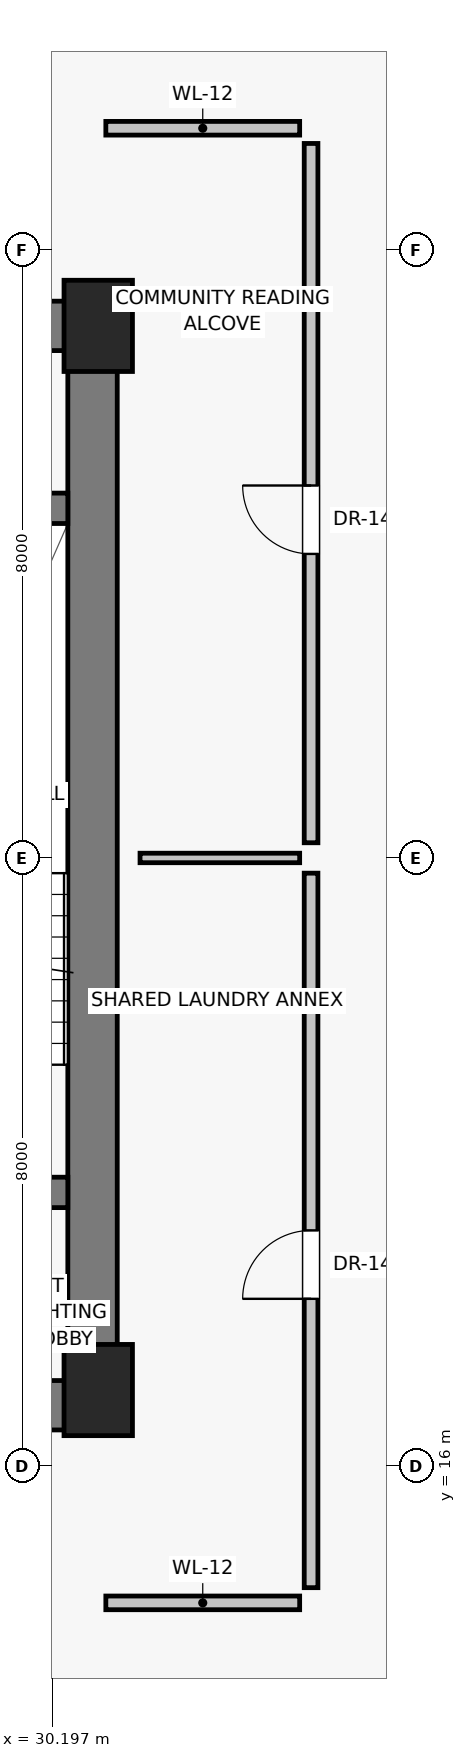
"""IFC4 building model, lengths in metres.
Left out: names, types, materials, properties, quantities, classifications, styles, units other than length and angle.
Written with IfcOpenShell. Run it as: python <this file> out.ifc"""

import sys

from ifc_helpers import new_model, si_unit, direction, frame, frame_2d, origin, origin_2d, place, context, subcontext, project, spatial, rectangle, extrude, source, transform, mapped, element, fill, save


model = new_model("IFC4")
c1 = context("Model", 3, precision=1e-05, world=origin(), true_north=direction((0.0, 1.0)))
c2 = subcontext(c1, "Body", "Model", "MODEL_VIEW")
j1 = project(units=[si_unit("LENGTHUNIT", "METRE"), si_unit("PLANEANGLEUNIT", "RADIAN")], contexts=[c1])
p1 = place(None, origin())
s1 = spatial("IfcSite", under=j1, at=p1, CompositionType="ELEMENT")
p2 = place(p1, origin())
s2 = spatial("IfcBuilding", under=s1, at=p2, CompositionType="ELEMENT")
p3 = place(p2, frame((0.0, 0.0, 139.25)))
s3 = spatial("IfcBuildingStorey", under=s2, at=p3, CompositionType="ELEMENT", Elevation=139.25)
for number, where, z_axis, x_axis in (
    (1, (30.8, 17.0, 0.0), (0.0, 0.0, 1.0), (1.0, 0.0, 0.0)),
    (2, (30.8, 31.0, 0.0), (0.0, 0.0, 1.0), (1.0, 0.0, 0.0)),
):
    element("IfcColumn", number, at=place(p3, frame(where, z_axis=z_axis, x_axis=x_axis)), inside=s3, PredefinedType="PILASTER", context=c2, shape_type="SweptSolid", body=[
        extrude(rectangle(XDim=0.9, YDim=1.2, at=origin_2d()), origin(), (0.0, 0.0, 1.0), 3.25),
    ])
p4 = place(p3, frame((30.725, 16.8, 0.0), z_axis=(0.0, 0.0, 1.0), x_axis=(0.0, 1.0, 0.0)))
e3 = element("IfcWall", 3, at=p4, inside=s3, PredefinedType="SHEAR", context=c2, shape_type="SweptSolid", body=[
    extrude(rectangle(XDim=14.2, YDim=0.65, at=frame_2d((7.1, 0.0))), origin(), (0.0, 0.0, 1.0), 3.0),
])
p5 = place(p3, frame((24.95, 16.8, 0.0), z_axis=(0.0, 0.0, 1.0), x_axis=(1.0, 0.0, 0.0)))
e4 = element("IfcWall", 4, at=p5, inside=s3, PredefinedType="SHEAR", context=c2, shape_type="SweptSolid", body=[
    extrude(rectangle(XDim=5.85, YDim=0.65, at=frame_2d((2.925, 0.0))), origin(), (0.0, 0.0, 1.0), 3.0),
])
p6 = place(p5, frame((2.15, 0.0, 0.0)))
e5 = element("IfcOpeningElement", 5, at=p6, cuts=e4, PredefinedType="OPENING", context=c2, shape_type="SweptSolid", body=[
    extrude(rectangle(XDim=1.2, YDim=2.03, at=frame_2d((0.6, 1.015))), frame((0.0, 0.335, 0.0), z_axis=(0.0, -1.0, 0.0), x_axis=(1.0, 0.0, 0.0)), (0.0, 0.0, 1.0), 0.67),
])
p7 = place(p3, frame((27.0, 31.0, 0.0), z_axis=(0.0, 0.0, 1.0), x_axis=(1.0, 0.0, 0.0)))
e6 = element("IfcWall", 6, at=p7, inside=s3, PredefinedType="SHEAR", context=c2, shape_type="SweptSolid", body=[
    extrude(rectangle(XDim=3.8, YDim=0.65, at=frame_2d((1.9, 0.0))), origin(), (0.0, 0.0, 1.0), 3.0),
])
p8 = place(p7, frame((0.45, 0.0, 0.0)))
e7 = element("IfcOpeningElement", 7, at=p8, cuts=e6, PredefinedType="OPENING", context=c2, shape_type="SweptSolid", body=[
    extrude(rectangle(XDim=0.86, YDim=2.01, at=frame_2d((0.43, 1.005))), frame((0.0, 0.335, 0.0), z_axis=(0.0, -1.0, 0.0), x_axis=(1.0, 0.0, 0.0)), (0.0, 0.0, 1.0), 0.67),
])
p9 = place(p7, frame((1.9, 0.0, 0.0)))
e8 = element("IfcOpeningElement", 8, at=p9, cuts=e6, PredefinedType="OPENING", context=c2, shape_type="SweptSolid", body=[
    extrude(rectangle(XDim=0.86, YDim=2.01, at=frame_2d((0.43, 1.005))), frame((0.0, 0.335, 0.0), z_axis=(0.0, -1.0, 0.0), x_axis=(1.0, 0.0, 0.0)), (0.0, 0.0, 1.0), 0.67),
])
p10 = place(p3, frame((27.0, 19.6, 0.0), z_axis=(0.0, 0.0, 1.0), x_axis=(1.0, 0.0, 0.0)))
e9 = element("IfcWall", 9, at=p10, inside=s3, PredefinedType="SHEAR", context=c2, shape_type="SweptSolid", body=[
    extrude(rectangle(XDim=3.4, YDim=0.4, at=frame_2d((1.7, 0.0))), origin(), (0.0, 0.0, 1.0), 3.0),
])
p11 = place(p10, frame((1.05, 0.0, 0.0)))
e10 = element("IfcOpeningElement", 10, at=p11, cuts=e9, PredefinedType="OPENING", context=c2, shape_type="SweptSolid", body=[
    extrude(rectangle(XDim=1.1, YDim=2.03, at=frame_2d((0.55, 1.015))), frame((0.0, 0.21, 0.0), z_axis=(0.0, -1.0, 0.0), x_axis=(1.0, 0.0, 0.0)), (0.0, 0.0, 1.0), 0.42),
])
p12 = place(p3, frame((27.0, 28.6, 0.0), z_axis=(0.0, 0.0, 1.0), x_axis=(1.0, 0.0, 0.0)))
e11 = element("IfcWall", 11, at=p12, inside=s3, PredefinedType="SHEAR", context=c2, shape_type="SweptSolid", body=[
    extrude(rectangle(XDim=3.4, YDim=0.4, at=frame_2d((1.7, 0.0))), origin(), (0.0, 0.0, 1.0), 3.0),
])
p13 = place(p3, frame((33.6, 14.4, 0.0), z_axis=(0.0, 0.0, 1.0), x_axis=(0.0, 1.0, 0.0)))
e12 = element("IfcWall", 12, at=p13, inside=s3, PredefinedType="PARTITIONING", context=c2, shape_type="SweptSolid", body=[
    extrude(rectangle(XDim=9.4, YDim=0.18, at=frame_2d((4.7, 0.0))), origin(), (0.0, 0.0, 1.0), 3.0),
])
p14 = place(p13, frame((3.8, 0.0, 0.0)))
e13 = element("IfcOpeningElement", 13, at=p14, cuts=e12, PredefinedType="OPENING", context=c2, shape_type="SweptSolid", body=[
    extrude(rectangle(XDim=0.9, YDim=2.01, at=frame_2d((0.45, 1.005))), frame((0.0, 0.1, 0.0), z_axis=(0.0, -1.0, 0.0), x_axis=(1.0, 0.0, 0.0)), (0.0, 0.0, 1.0), 0.2),
])
p15 = place(p3, frame((33.6, 24.2, 0.0), z_axis=(0.0, 0.0, 1.0), x_axis=(0.0, 1.0, 0.0)))
e14 = element("IfcWall", 14, at=p15, inside=s3, PredefinedType="PARTITIONING", context=c2, shape_type="SweptSolid", body=[
    extrude(rectangle(XDim=9.2, YDim=0.18, at=frame_2d((4.6, 0.0))), origin(), (0.0, 0.0, 1.0), 3.0),
])
p16 = place(p15, frame((3.8, 0.0, 0.0)))
e15 = element("IfcOpeningElement", 15, at=p16, cuts=e14, PredefinedType="OPENING", context=c2, shape_type="SweptSolid", body=[
    extrude(rectangle(XDim=0.9, YDim=2.01, at=frame_2d((0.45, 1.005))), frame((0.0, 0.1, 0.0), z_axis=(0.0, -1.0, 0.0), x_axis=(1.0, 0.0, 0.0)), (0.0, 0.0, 1.0), 0.2),
])
p17 = place(p3, frame((31.35, 24.0, 0.0), z_axis=(0.0, 0.0, 1.0), x_axis=(1.0, 0.0, 0.0)))
e16 = element("IfcWall", 16, at=p17, inside=s3, PredefinedType="PARTITIONING", context=c2, shape_type="SweptSolid", body=[
    extrude(rectangle(XDim=2.1, YDim=0.125, at=frame_2d((1.05, 0.0))), origin(), (0.0, 0.0, 1.0), 3.0),
])
for number, where, z_axis, x_axis in (
    (17, (30.9, 14.2, 0.0), (0.0, 0.0, 1.0), (1.0, 0.0, 0.0)),
    (18, (30.9, 33.6, 0.0), (0.0, 0.0, 1.0), (1.0, 0.0, 0.0)),
):
    element("IfcWall", number, at=place(p3, frame(where, z_axis=z_axis, x_axis=x_axis)), inside=s3, PredefinedType="PARTITIONING", context=c2, shape_type="SweptSolid", body=[
        extrude(rectangle(XDim=2.55, YDim=0.18, at=frame_2d((1.275, 0.0))), origin(), (0.0, 0.0, 1.0), 3.0),
    ])
m1 = source(origin(), c2, "Body", "SweptSolid", [
    extrude(rectangle(XDim=0.9, YDim=2.01, at=frame_2d((0.45, 1.005))), frame((0.0, 0.025, 0.0), z_axis=(0.0, -1.0, 0.0), x_axis=(1.0, 0.0, 0.0)), (0.0, 0.0, 1.0), 0.05),
])
p18 = place(p14, origin())
e19 = element("IfcDoor", 19, at=p18, inside=s3, OperationType="SINGLE_SWING_LEFT", PredefinedType="DOOR", context=c2, shape_type="MappedRepresentation", body=[
    mapped(m1, transform((0.0, 0.0, 0.0), scale=1.0)),
])
fill(e13, e19)
p19 = place(p16, origin())
e20 = element("IfcDoor", 20, at=p19, inside=s3, OperationType="SINGLE_SWING_RIGHT", PredefinedType="DOOR", context=c2, shape_type="MappedRepresentation", body=[
    mapped(m1, transform((0.0, 0.0, 0.0), scale=1.0)),
])
fill(e15, e20)
save(model, sys.argv[1])
